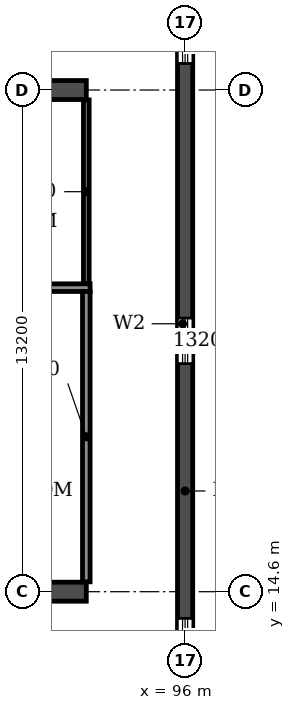
"""IFC4 building model, lengths in metres.
Left out: names, types, materials, properties, quantities, classifications, styles, units other than length and angle.
Written with IfcOpenShell. Run it as: python <this file> out.ifc"""

import sys

from ifc_helpers import new_model, si_unit, direction, frame, frame_2d, origin, place, context, subcontext, project, spatial, rectangle, extrude, element, fill, save


model = new_model("IFC4")
c1 = context("Model", 3, precision=1e-05, world=origin(), true_north=direction((0.0, 1.0)))
c2 = subcontext(c1, "Body", "Model", "MODEL_VIEW")
j1 = project(units=[si_unit("LENGTHUNIT", "METRE"), si_unit("PLANEANGLEUNIT", "RADIAN")], contexts=[c1])
p1 = place(None, origin())
s1 = spatial("IfcSite", under=j1, at=p1, CompositionType="ELEMENT")
p2 = place(p1, origin())
s2 = spatial("IfcBuilding", under=s1, at=p2, CompositionType="ELEMENT")
p3 = place(p2, frame((0.0, 0.0, 72.9)))
s3 = spatial("IfcBuildingStorey", under=s2, at=p3, CompositionType="ELEMENT", Elevation=72.9)
p4 = place(p3, frame((96.0, 4.683, 0.0), z_axis=(0.0, 0.0, 1.0), x_axis=(0.0, 1.0, 0.0)))
e1 = element("IfcWall", 1, at=p4, inside=s3, PredefinedType="SHEAR", context=c2, shape_type="SweptSolid", body=[
    extrude(rectangle(XDim=34.234, YDim=0.4, at=frame_2d((17.117, 0.0))), origin(), (0.0, 0.0, 1.0), 3.06),
])
p5 = place(p4, frame((15.917, 0.0, 0.9)))
e2 = element("IfcOpeningElement", 2, at=p5, cuts=e1, PredefinedType="OPENING", context=c2, shape_type="SweptSolid", body=[
    extrude(rectangle(XDim=1.2, YDim=1.5, at=frame_2d((0.6, 0.75))), frame((0.0, 0.21, 0.0), z_axis=(0.0, -1.0, 0.0), x_axis=(1.0, 0.0, 0.0)), (0.0, 0.0, 1.0), 0.42),
])
p6 = place(p4, frame((23.817, 0.0, 0.9)))
e3 = element("IfcOpeningElement", 3, at=p6, cuts=e1, PredefinedType="OPENING", context=c2, shape_type="SweptSolid", body=[
    extrude(rectangle(XDim=1.2, YDim=1.5, at=frame_2d((0.6, 0.75))), frame((0.0, 0.21, 0.0), z_axis=(0.0, -1.0, 0.0), x_axis=(1.0, 0.0, 0.0)), (0.0, 0.0, 1.0), 0.42),
])
p7 = place(p4, frame((8.017, 0.0, 0.9)))
e4 = element("IfcOpeningElement", 4, at=p7, cuts=e1, PredefinedType="OPENING", context=c2, shape_type="SweptSolid", body=[
    extrude(rectangle(XDim=1.2, YDim=1.5, at=frame_2d((0.6, 0.75))), frame((0.0, 0.21, 0.0), z_axis=(0.0, -1.0, 0.0), x_axis=(1.0, 0.0, 0.0)), (0.0, 0.0, 1.0), 0.42),
])
p8 = place(p4, frame((28.894, 0.0, 0.6)))
e5 = element("IfcOpeningElement", 5, at=p8, cuts=e1, PredefinedType="OPENING", context=c2, shape_type="SweptSolid", body=[
    extrude(rectangle(XDim=2.2, YDim=1.8, at=frame_2d((1.1, 0.9))), frame((0.0, 0.21, 0.0), z_axis=(0.0, -1.0, 0.0), x_axis=(1.0, 0.0, 0.0)), (0.0, 0.0, 1.0), 0.42),
])
p9 = place(p4, frame((2.541, 0.0, 0.6)))
e6 = element("IfcOpeningElement", 6, at=p9, cuts=e1, PredefinedType="OPENING", context=c2, shape_type="SweptSolid", body=[
    extrude(rectangle(XDim=2.2, YDim=1.8, at=frame_2d((1.1, 0.9))), frame((0.0, 0.21, 0.0), z_axis=(0.0, -1.0, 0.0), x_axis=(1.0, 0.0, 0.0)), (0.0, 0.0, 1.0), 0.42),
])
p10 = place(p3, frame((8.6, 14.6, 0.0), z_axis=(0.0, 0.0, 1.0), x_axis=(1.0, 0.0, 0.0)))
e7 = element("IfcWall", 7, at=p10, inside=s3, PredefinedType="SOLIDWALL", context=c2, shape_type="SweptSolid", body=[
    extrude(rectangle(XDim=84.8, YDim=0.5, at=frame_2d((42.4, 0.0))), origin(), (0.0, 0.0, 1.0), 3.06),
])
p11 = place(p10, frame((2.25, 0.0, 0.0)))
e8 = element("IfcOpeningElement", 8, at=p11, cuts=e7, PredefinedType="OPENING", context=c2, shape_type="SweptSolid", body=[
    extrude(rectangle(XDim=1.0, YDim=2.1, at=frame_2d((0.5, 1.05))), frame((0.0, 0.26, 0.0), z_axis=(0.0, -1.0, 0.0), x_axis=(1.0, 0.0, 0.0)), (0.0, 0.0, 1.0), 0.52),
])
p12 = place(p10, frame((6.95, 0.0, 0.0)))
e9 = element("IfcOpeningElement", 9, at=p12, cuts=e7, PredefinedType="OPENING", context=c2, shape_type="SweptSolid", body=[
    extrude(rectangle(XDim=1.0, YDim=2.1, at=frame_2d((0.5, 1.05))), frame((0.0, 0.26, 0.0), z_axis=(0.0, -1.0, 0.0), x_axis=(1.0, 0.0, 0.0)), (0.0, 0.0, 1.0), 0.52),
])
p13 = place(p10, frame((10.3, 0.0, 0.0)))
e10 = element("IfcOpeningElement", 10, at=p13, cuts=e7, PredefinedType="OPENING", context=c2, shape_type="SweptSolid", body=[
    extrude(rectangle(XDim=1.0, YDim=2.1, at=frame_2d((0.5, 1.05))), frame((0.0, 0.26, 0.0), z_axis=(0.0, -1.0, 0.0), x_axis=(1.0, 0.0, 0.0)), (0.0, 0.0, 1.0), 0.52),
])
p14 = place(p10, frame((18.2, 0.0, 0.0)))
e11 = element("IfcOpeningElement", 11, at=p14, cuts=e7, PredefinedType="OPENING", context=c2, shape_type="SweptSolid", body=[
    extrude(rectangle(XDim=1.0, YDim=2.1, at=frame_2d((0.5, 1.05))), frame((0.0, 0.26, 0.0), z_axis=(0.0, -1.0, 0.0), x_axis=(1.0, 0.0, 0.0)), (0.0, 0.0, 1.0), 0.52),
])
p15 = place(p10, frame((22.8, 0.0, 0.0)))
e12 = element("IfcOpeningElement", 12, at=p15, cuts=e7, PredefinedType="OPENING", context=c2, shape_type="SweptSolid", body=[
    extrude(rectangle(XDim=1.0, YDim=2.1, at=frame_2d((0.5, 1.05))), frame((0.0, 0.26, 0.0), z_axis=(0.0, -1.0, 0.0), x_axis=(1.0, 0.0, 0.0)), (0.0, 0.0, 1.0), 0.52),
])
p16 = place(p10, frame((35.4, 0.0, 0.0)))
e13 = element("IfcOpeningElement", 13, at=p16, cuts=e7, PredefinedType="OPENING", context=c2, shape_type="SweptSolid", body=[
    extrude(rectangle(XDim=1.0, YDim=2.1, at=frame_2d((0.5, 1.05))), frame((0.0, 0.26, 0.0), z_axis=(0.0, -1.0, 0.0), x_axis=(1.0, 0.0, 0.0)), (0.0, 0.0, 1.0), 0.52),
])
p17 = place(p10, frame((39.3, 0.0, 0.0)))
e14 = element("IfcOpeningElement", 14, at=p17, cuts=e7, PredefinedType="OPENING", context=c2, shape_type="SweptSolid", body=[
    extrude(rectangle(XDim=1.0, YDim=2.1, at=frame_2d((0.5, 1.05))), frame((0.0, 0.26, 0.0), z_axis=(0.0, -1.0, 0.0), x_axis=(1.0, 0.0, 0.0)), (0.0, 0.0, 1.0), 0.52),
])
p18 = place(p10, frame((41.9, 0.0, 0.0)))
e15 = element("IfcOpeningElement", 15, at=p18, cuts=e7, PredefinedType="OPENING", context=c2, shape_type="SweptSolid", body=[
    extrude(rectangle(XDim=1.0, YDim=2.1, at=frame_2d((0.5, 1.05))), frame((0.0, 0.26, 0.0), z_axis=(0.0, -1.0, 0.0), x_axis=(1.0, 0.0, 0.0)), (0.0, 0.0, 1.0), 0.52),
])
p19 = place(p10, frame((44.5, 0.0, 0.0)))
e16 = element("IfcOpeningElement", 16, at=p19, cuts=e7, PredefinedType="OPENING", context=c2, shape_type="SweptSolid", body=[
    extrude(rectangle(XDim=1.0, YDim=2.1, at=frame_2d((0.5, 1.05))), frame((0.0, 0.26, 0.0), z_axis=(0.0, -1.0, 0.0), x_axis=(1.0, 0.0, 0.0)), (0.0, 0.0, 1.0), 0.52),
])
p20 = place(p10, frame((48.4, 0.0, 0.0)))
e17 = element("IfcOpeningElement", 17, at=p20, cuts=e7, PredefinedType="OPENING", context=c2, shape_type="SweptSolid", body=[
    extrude(rectangle(XDim=1.0, YDim=2.1, at=frame_2d((0.5, 1.05))), frame((0.0, 0.26, 0.0), z_axis=(0.0, -1.0, 0.0), x_axis=(1.0, 0.0, 0.0)), (0.0, 0.0, 1.0), 0.52),
])
p21 = place(p10, frame((61.0, 0.0, 0.0)))
e18 = element("IfcOpeningElement", 18, at=p21, cuts=e7, PredefinedType="OPENING", context=c2, shape_type="SweptSolid", body=[
    extrude(rectangle(XDim=1.0, YDim=2.1, at=frame_2d((0.5, 1.05))), frame((0.0, 0.26, 0.0), z_axis=(0.0, -1.0, 0.0), x_axis=(1.0, 0.0, 0.0)), (0.0, 0.0, 1.0), 0.52),
])
p22 = place(p10, frame((65.6, 0.0, 0.0)))
e19 = element("IfcOpeningElement", 19, at=p22, cuts=e7, PredefinedType="OPENING", context=c2, shape_type="SweptSolid", body=[
    extrude(rectangle(XDim=1.0, YDim=2.1, at=frame_2d((0.5, 1.05))), frame((0.0, 0.26, 0.0), z_axis=(0.0, -1.0, 0.0), x_axis=(1.0, 0.0, 0.0)), (0.0, 0.0, 1.0), 0.52),
])
p23 = place(p10, frame((73.5, 0.0, 0.0)))
e20 = element("IfcOpeningElement", 20, at=p23, cuts=e7, PredefinedType="OPENING", context=c2, shape_type="SweptSolid", body=[
    extrude(rectangle(XDim=1.0, YDim=2.1, at=frame_2d((0.5, 1.05))), frame((0.0, 0.26, 0.0), z_axis=(0.0, -1.0, 0.0), x_axis=(1.0, 0.0, 0.0)), (0.0, 0.0, 1.0), 0.52),
])
p24 = place(p10, frame((76.55, 0.0, 0.0)))
e21 = element("IfcOpeningElement", 21, at=p24, cuts=e7, PredefinedType="OPENING", context=c2, shape_type="SweptSolid", body=[
    extrude(rectangle(XDim=1.0, YDim=2.1, at=frame_2d((0.5, 1.05))), frame((0.0, 0.26, 0.0), z_axis=(0.0, -1.0, 0.0), x_axis=(1.0, 0.0, 0.0)), (0.0, 0.0, 1.0), 0.52),
])
p25 = place(p10, frame((81.0, 0.0, 0.0)))
e22 = element("IfcOpeningElement", 22, at=p25, cuts=e7, PredefinedType="OPENING", context=c2, shape_type="SweptSolid", body=[
    extrude(rectangle(XDim=1.5, YDim=2.1, at=frame_2d((0.75, 1.05))), frame((0.0, 0.26, 0.0), z_axis=(0.0, -1.0, 0.0), x_axis=(1.0, 0.0, 0.0)), (0.0, 0.0, 1.0), 0.52),
])
p26 = place(p3, frame((8.6, 27.8, 0.0), z_axis=(0.0, 0.0, 1.0), x_axis=(1.0, 0.0, 0.0)))
e23 = element("IfcWall", 23, at=p26, inside=s3, PredefinedType="SOLIDWALL", context=c2, shape_type="SweptSolid", body=[
    extrude(rectangle(XDim=84.8, YDim=0.5, at=frame_2d((42.4, 0.0))), origin(), (0.0, 0.0, 1.0), 3.06),
])
p27 = place(p26, frame((2.0, 0.0, 0.0)))
e24 = element("IfcOpeningElement", 24, at=p27, cuts=e23, PredefinedType="OPENING", context=c2, shape_type="SweptSolid", body=[
    extrude(rectangle(XDim=1.5, YDim=2.1, at=frame_2d((0.75, 1.05))), frame((0.0, 0.26, 0.0), z_axis=(0.0, -1.0, 0.0), x_axis=(1.0, 0.0, 0.0)), (0.0, 0.0, 1.0), 0.52),
])
p28 = place(p26, frame((6.95, 0.0, 0.0)))
e25 = element("IfcOpeningElement", 25, at=p28, cuts=e23, PredefinedType="OPENING", context=c2, shape_type="SweptSolid", body=[
    extrude(rectangle(XDim=1.0, YDim=2.1, at=frame_2d((0.5, 1.05))), frame((0.0, 0.26, 0.0), z_axis=(0.0, -1.0, 0.0), x_axis=(1.0, 0.0, 0.0)), (0.0, 0.0, 1.0), 0.52),
])
p29 = place(p26, frame((10.3, 0.0, 0.0)))
e26 = element("IfcOpeningElement", 26, at=p29, cuts=e23, PredefinedType="OPENING", context=c2, shape_type="SweptSolid", body=[
    extrude(rectangle(XDim=1.0, YDim=2.1, at=frame_2d((0.5, 1.05))), frame((0.0, 0.26, 0.0), z_axis=(0.0, -1.0, 0.0), x_axis=(1.0, 0.0, 0.0)), (0.0, 0.0, 1.0), 0.52),
])
p30 = place(p26, frame((13.65, 0.0, 0.0)))
e27 = element("IfcOpeningElement", 27, at=p30, cuts=e23, PredefinedType="OPENING", context=c2, shape_type="SweptSolid", body=[
    extrude(rectangle(XDim=0.9, YDim=2.1, at=frame_2d((0.45, 1.05))), frame((0.0, 0.26, 0.0), z_axis=(0.0, -1.0, 0.0), x_axis=(1.0, 0.0, 0.0)), (0.0, 0.0, 1.0), 0.52),
])
p31 = place(p26, frame((22.85, 0.0, 0.0)))
e28 = element("IfcOpeningElement", 28, at=p31, cuts=e23, PredefinedType="OPENING", context=c2, shape_type="SweptSolid", body=[
    extrude(rectangle(XDim=0.9, YDim=2.1, at=frame_2d((0.45, 1.05))), frame((0.0, 0.26, 0.0), z_axis=(0.0, -1.0, 0.0), x_axis=(1.0, 0.0, 0.0)), (0.0, 0.0, 1.0), 0.52),
])
p32 = place(p26, frame((26.0, 0.0, 0.0)))
e29 = element("IfcOpeningElement", 29, at=p32, cuts=e23, PredefinedType="OPENING", context=c2, shape_type="SweptSolid", body=[
    extrude(rectangle(XDim=1.0, YDim=2.1, at=frame_2d((0.5, 1.05))), frame((0.0, 0.26, 0.0), z_axis=(0.0, -1.0, 0.0), x_axis=(1.0, 0.0, 0.0)), (0.0, 0.0, 1.0), 0.52),
])
p33 = place(p26, frame((31.2, 0.0, 0.0)))
e30 = element("IfcOpeningElement", 30, at=p33, cuts=e23, PredefinedType="OPENING", context=c2, shape_type="SweptSolid", body=[
    extrude(rectangle(XDim=1.0, YDim=2.1, at=frame_2d((0.5, 1.05))), frame((0.0, 0.26, 0.0), z_axis=(0.0, -1.0, 0.0), x_axis=(1.0, 0.0, 0.0)), (0.0, 0.0, 1.0), 0.52),
])
p34 = place(p26, frame((39.0, 0.0, 0.0)))
e31 = element("IfcOpeningElement", 31, at=p34, cuts=e23, PredefinedType="OPENING", context=c2, shape_type="SweptSolid", body=[
    extrude(rectangle(XDim=1.0, YDim=2.1, at=frame_2d((0.5, 1.05))), frame((0.0, 0.26, 0.0), z_axis=(0.0, -1.0, 0.0), x_axis=(1.0, 0.0, 0.0)), (0.0, 0.0, 1.0), 0.52),
])
p35 = place(p26, frame((41.9, 0.0, 0.0)))
e32 = element("IfcOpeningElement", 32, at=p35, cuts=e23, PredefinedType="OPENING", context=c2, shape_type="SweptSolid", body=[
    extrude(rectangle(XDim=1.0, YDim=2.1, at=frame_2d((0.5, 1.05))), frame((0.0, 0.26, 0.0), z_axis=(0.0, -1.0, 0.0), x_axis=(1.0, 0.0, 0.0)), (0.0, 0.0, 1.0), 0.52),
])
p36 = place(p26, frame((44.8, 0.0, 0.0)))
e33 = element("IfcOpeningElement", 33, at=p36, cuts=e23, PredefinedType="OPENING", context=c2, shape_type="SweptSolid", body=[
    extrude(rectangle(XDim=1.0, YDim=2.1, at=frame_2d((0.5, 1.05))), frame((0.0, 0.26, 0.0), z_axis=(0.0, -1.0, 0.0), x_axis=(1.0, 0.0, 0.0)), (0.0, 0.0, 1.0), 0.52),
])
p37 = place(p26, frame((48.7, 0.0, 0.0)))
e34 = element("IfcOpeningElement", 34, at=p37, cuts=e23, PredefinedType="OPENING", context=c2, shape_type="SweptSolid", body=[
    extrude(rectangle(XDim=1.0, YDim=2.1, at=frame_2d((0.5, 1.05))), frame((0.0, 0.26, 0.0), z_axis=(0.0, -1.0, 0.0), x_axis=(1.0, 0.0, 0.0)), (0.0, 0.0, 1.0), 0.52),
])
p38 = place(p26, frame((55.2, 0.0, 0.0)))
e35 = element("IfcOpeningElement", 35, at=p38, cuts=e23, PredefinedType="OPENING", context=c2, shape_type="SweptSolid", body=[
    extrude(rectangle(XDim=1.0, YDim=2.1, at=frame_2d((0.5, 1.05))), frame((0.0, 0.26, 0.0), z_axis=(0.0, -1.0, 0.0), x_axis=(1.0, 0.0, 0.0)), (0.0, 0.0, 1.0), 0.52),
])
p39 = place(p26, frame((61.05, 0.0, 0.0)))
e36 = element("IfcOpeningElement", 36, at=p39, cuts=e23, PredefinedType="OPENING", context=c2, shape_type="SweptSolid", body=[
    extrude(rectangle(XDim=0.9, YDim=2.1, at=frame_2d((0.45, 1.05))), frame((0.0, 0.26, 0.0), z_axis=(0.0, -1.0, 0.0), x_axis=(1.0, 0.0, 0.0)), (0.0, 0.0, 1.0), 0.52),
])
p40 = place(p26, frame((70.25, 0.0, 0.0)))
e37 = element("IfcOpeningElement", 37, at=p40, cuts=e23, PredefinedType="OPENING", context=c2, shape_type="SweptSolid", body=[
    extrude(rectangle(XDim=0.9, YDim=2.1, at=frame_2d((0.45, 1.05))), frame((0.0, 0.26, 0.0), z_axis=(0.0, -1.0, 0.0), x_axis=(1.0, 0.0, 0.0)), (0.0, 0.0, 1.0), 0.52),
])
p41 = place(p26, frame((73.5, 0.0, 0.0)))
e38 = element("IfcOpeningElement", 38, at=p41, cuts=e23, PredefinedType="OPENING", context=c2, shape_type="SweptSolid", body=[
    extrude(rectangle(XDim=1.0, YDim=2.1, at=frame_2d((0.5, 1.05))), frame((0.0, 0.26, 0.0), z_axis=(0.0, -1.0, 0.0), x_axis=(1.0, 0.0, 0.0)), (0.0, 0.0, 1.0), 0.52),
])
p42 = place(p26, frame((76.25, 0.0, 0.0)))
e39 = element("IfcOpeningElement", 39, at=p42, cuts=e23, PredefinedType="OPENING", context=c2, shape_type="SweptSolid", body=[
    extrude(rectangle(XDim=1.0, YDim=2.1, at=frame_2d((0.5, 1.05))), frame((0.0, 0.26, 0.0), z_axis=(0.0, -1.0, 0.0), x_axis=(1.0, 0.0, 0.0)), (0.0, 0.0, 1.0), 0.52),
])
p43 = place(p26, frame((80.95, 0.0, 0.0)))
e40 = element("IfcOpeningElement", 40, at=p43, cuts=e23, PredefinedType="OPENING", context=c2, shape_type="SweptSolid", body=[
    extrude(rectangle(XDim=1.0, YDim=2.1, at=frame_2d((0.5, 1.05))), frame((0.0, 0.26, 0.0), z_axis=(0.0, -1.0, 0.0), x_axis=(1.0, 0.0, 0.0)), (0.0, 0.0, 1.0), 0.52),
])
p44 = place(p3, frame((93.4, 22.7, 0.0), z_axis=(0.0, 0.0, 1.0), x_axis=(0.0, 1.0, 0.0)))
e41 = element("IfcWall", 41, at=p44, inside=s3, PredefinedType="PARTITIONING", context=c2, shape_type="SweptSolid", body=[
    extrude(rectangle(XDim=4.84, YDim=0.15, at=frame_2d((2.42, 0.0))), origin(), (0.0, 0.0, 1.0), 3.06),
])
p45 = place(p3, frame((87.2, 22.6, 0.0), z_axis=(0.0, 0.0, 1.0), x_axis=(1.0, 0.0, 0.0)))
e42 = element("IfcWall", 42, at=p45, inside=s3, PredefinedType="PARTITIONING", context=c2, shape_type="SweptSolid", body=[
    extrude(rectangle(XDim=6.3, YDim=0.2, at=frame_2d((3.15, 0.0))), origin(), (0.0, 0.0, 1.0), 3.06),
])
p46 = place(p3, frame((93.4, 14.86, 0.0), z_axis=(0.0, 0.0, 1.0), x_axis=(0.0, 1.0, 0.0)))
e43 = element("IfcWall", 43, at=p46, inside=s3, PredefinedType="PARTITIONING", context=c2, shape_type="SweptSolid", body=[
    extrude(rectangle(XDim=7.64, YDim=0.2, at=frame_2d((3.82, 0.0))), origin(), (0.0, 0.0, 1.0), 3.06),
])
p47 = place(p5, origin())
e44 = element("IfcWindow", 44, at=p47, inside=s3, PartitioningType="SINGLE_PANEL", PredefinedType="WINDOW", context=c2, shape_type="SweptSolid", body=[
    extrude(rectangle(XDim=1.2, YDim=1.5, at=frame_2d((0.6, 0.75))), frame((0.0, 0.03, 0.0), z_axis=(0.0, -1.0, 0.0), x_axis=(1.0, 0.0, 0.0)), (0.0, 0.0, 1.0), 0.06),
])
fill(e2, e44)
p48 = place(p6, origin())
e45 = element("IfcWindow", 45, at=p48, inside=s3, PartitioningType="SINGLE_PANEL", PredefinedType="WINDOW", context=c2, shape_type="SweptSolid", body=[
    extrude(rectangle(XDim=1.2, YDim=1.5, at=frame_2d((0.6, 0.75))), frame((0.0, 0.03, 0.0), z_axis=(0.0, -1.0, 0.0), x_axis=(1.0, 0.0, 0.0)), (0.0, 0.0, 1.0), 0.06),
])
fill(e3, e45)
p49 = place(p7, origin())
e46 = element("IfcWindow", 46, at=p49, inside=s3, PartitioningType="SINGLE_PANEL", PredefinedType="WINDOW", context=c2, shape_type="SweptSolid", body=[
    extrude(rectangle(XDim=1.2, YDim=1.5, at=frame_2d((0.6, 0.75))), frame((0.0, 0.03, 0.0), z_axis=(0.0, -1.0, 0.0), x_axis=(1.0, 0.0, 0.0)), (0.0, 0.0, 1.0), 0.06),
])
fill(e4, e46)
save(model, sys.argv[1])
